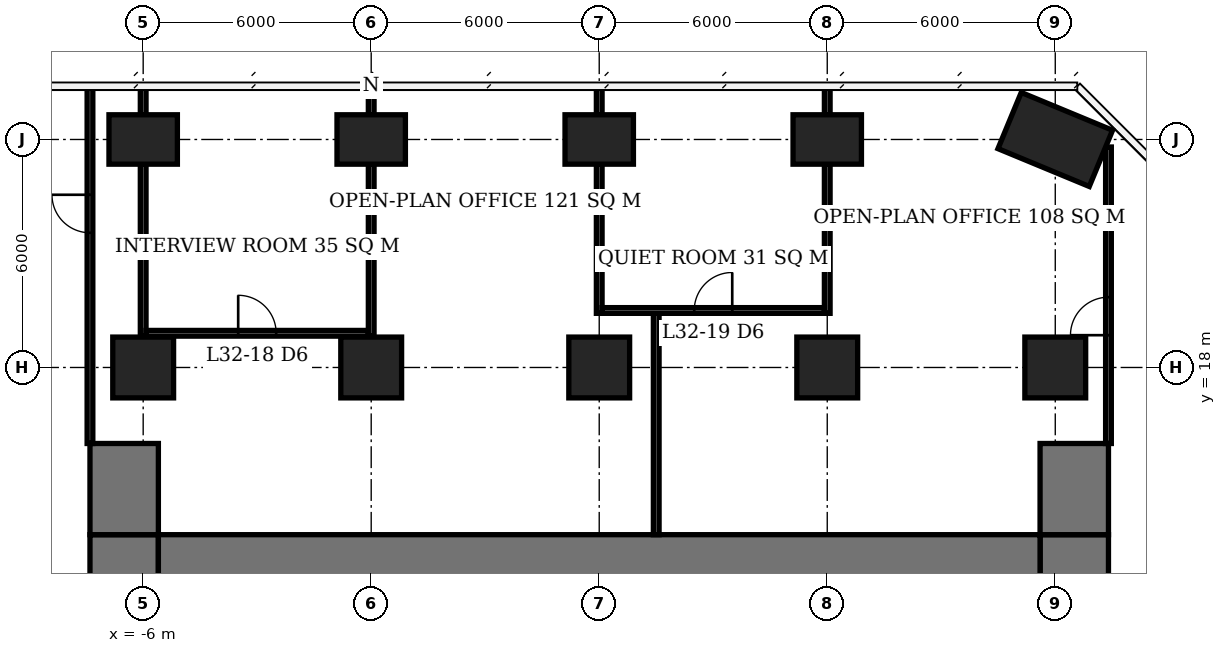
"""IFC4 building model, lengths in metres.
Left out: names, types, materials, properties, quantities, classifications, styles, units other than length and angle.
Written with IfcOpenShell. Run it as: python <this file> out.ifc"""

import sys

from ifc_helpers import new_model, si_unit, direction, frame, frame_2d, origin, origin_2d, place, context, subcontext, project, spatial, rectangle, extrude, element, fill, save


model = new_model("IFC4")
c1 = context("Model", 3, precision=1e-05, world=origin(), true_north=direction((0.0, 1.0)))
c2 = subcontext(c1, "Body", "Model", "MODEL_VIEW")
j1 = project(units=[si_unit("LENGTHUNIT", "METRE"), si_unit("PLANEANGLEUNIT", "RADIAN")], contexts=[c1])
p1 = place(None, origin())
s1 = spatial("IfcSite", under=j1, at=p1, CompositionType="ELEMENT")
p2 = place(p1, origin())
s2 = spatial("IfcBuilding", under=s1, at=p2, CompositionType="ELEMENT")
p3 = place(p2, frame((0.0, 0.0, 132.8)))
s3 = spatial("IfcBuildingStorey", under=s2, at=p3, CompositionType="ELEMENT", Elevation=132.8)
p4 = place(p3, frame((-6.0, 18.0, 0.0), z_axis=(0.0, 0.0, 1.0), x_axis=(1.0, 0.0, 0.0)))
e1 = element("IfcColumn", 1, at=p4, inside=s3, PredefinedType="COLUMN", context=c2, shape_type="SweptSolid", body=[
    extrude(rectangle(XDim=1.6, YDim=1.6, at=origin_2d()), origin(), (0.0, 0.0, 1.0), 3.9),
])
p5 = place(p3, frame((-6.0, 24.0, 0.0), z_axis=(0.0, 0.0, 1.0), x_axis=(1.0, 0.0, 0.0)))
e2 = element("IfcColumn", 2, at=p5, inside=s3, PredefinedType="COLUMN", context=c2, shape_type="SweptSolid", body=[
    extrude(rectangle(XDim=1.8, YDim=1.3, at=origin_2d()), origin(), (0.0, 0.0, 1.0), 3.9),
])
p6 = place(p3, frame((0.0, 18.0, 0.0), z_axis=(0.0, 0.0, 1.0), x_axis=(1.0, 0.0, 0.0)))
e3 = element("IfcColumn", 3, at=p6, inside=s3, PredefinedType="COLUMN", context=c2, shape_type="SweptSolid", body=[
    extrude(rectangle(XDim=1.6, YDim=1.6, at=origin_2d()), origin(), (0.0, 0.0, 1.0), 3.9),
])
p7 = place(p3, frame((0.0, 24.0, 0.0), z_axis=(0.0, 0.0, 1.0), x_axis=(1.0, 0.0, 0.0)))
e4 = element("IfcColumn", 4, at=p7, inside=s3, PredefinedType="COLUMN", context=c2, shape_type="SweptSolid", body=[
    extrude(rectangle(XDim=1.8, YDim=1.3, at=origin_2d()), origin(), (0.0, 0.0, 1.0), 3.9),
])
p8 = place(p3, frame((6.0, 18.0, 0.0), z_axis=(0.0, 0.0, 1.0), x_axis=(1.0, 0.0, 0.0)))
e5 = element("IfcColumn", 5, at=p8, inside=s3, PredefinedType="COLUMN", context=c2, shape_type="SweptSolid", body=[
    extrude(rectangle(XDim=1.6, YDim=1.6, at=origin_2d()), origin(), (0.0, 0.0, 1.0), 3.9),
])
p9 = place(p3, frame((6.0, 24.0, 0.0), z_axis=(0.0, 0.0, 1.0), x_axis=(1.0, 0.0, 0.0)))
e6 = element("IfcColumn", 6, at=p9, inside=s3, PredefinedType="COLUMN", context=c2, shape_type="SweptSolid", body=[
    extrude(rectangle(XDim=1.8, YDim=1.3, at=origin_2d()), origin(), (0.0, 0.0, 1.0), 3.9),
])
p10 = place(p3, frame((12.0, 18.0, 0.0), z_axis=(0.0, 0.0, 1.0), x_axis=(1.0, 0.0, 0.0)))
e7 = element("IfcColumn", 7, at=p10, inside=s3, PredefinedType="COLUMN", context=c2, shape_type="SweptSolid", body=[
    extrude(rectangle(XDim=1.6, YDim=1.6, at=origin_2d()), origin(), (0.0, 0.0, 1.0), 3.9),
])
p11 = place(p3, frame((12.0, 24.0, 0.0), z_axis=(0.0, 0.0, 1.0), x_axis=(1.0, 0.0, 0.0)))
e8 = element("IfcColumn", 8, at=p11, inside=s3, PredefinedType="COLUMN", context=c2, shape_type="SweptSolid", body=[
    extrude(rectangle(XDim=1.8, YDim=1.3, at=origin_2d()), origin(), (0.0, 0.0, 1.0), 3.9),
])
p12 = place(p3, frame((18.0, 18.0, 0.0), z_axis=(0.0, 0.0, 1.0), x_axis=(1.0, 0.0, 0.0)))
e9 = element("IfcColumn", 9, at=p12, inside=s3, PredefinedType="COLUMN", context=c2, shape_type="SweptSolid", body=[
    extrude(rectangle(XDim=1.6, YDim=1.6, at=origin_2d()), origin(), (0.0, 0.0, 1.0), 3.9),
])
p13 = place(p3, frame((18.0, 24.0, 0.0), z_axis=(0.0, 0.0, 1.0), x_axis=(0.923879532511, -0.382683432365, 0.0)))
e10 = element("IfcColumn", 10, at=p13, inside=s3, PredefinedType="COLUMN", context=c2, shape_type="SweptSolid", body=[
    extrude(rectangle(XDim=2.6, YDim=1.6, at=origin_2d()), origin(), (0.0, 0.0, 1.0), 3.9),
])
p14 = place(p3, frame((-5.6, 12.6, 0.0), z_axis=(0.0, 0.0, 1.0), x_axis=(1.0, 0.0, 0.0)))
e11 = element("IfcWall", 11, at=p14, inside=s3, PredefinedType="SHEAR", context=c2, shape_type="SweptSolid", body=[
    extrude(rectangle(XDim=23.2, YDim=2.0, at=frame_2d((11.6, 0.0))), origin(), (0.0, 0.0, 1.0), 3.9),
])
p15 = place(p3, frame((-6.5, -7.6, 0.0), z_axis=(0.0, 0.0, 1.0), x_axis=(0.0, 1.0, 0.0)))
e12 = element("IfcWall", 12, at=p15, inside=s3, PredefinedType="SHEAR", context=c2, shape_type="SweptSolid", body=[
    extrude(rectangle(XDim=21.2, YDim=1.8, at=frame_2d((10.6, 0.0))), origin(), (0.0, 0.0, 1.0), 3.9),
])
p16 = place(p15, frame((7.8, 0.0, 0.0)))
e13 = element("IfcOpeningElement", 13, at=p16, cuts=e12, PredefinedType="OPENING", context=c2, shape_type="SweptSolid", body=[
    extrude(rectangle(XDim=1.8, YDim=2.4, at=frame_2d((0.9, 1.2))), frame((0.0, 0.91, 0.0), z_axis=(0.0, -1.0, 0.0), x_axis=(1.0, 0.0, 0.0)), (0.0, 0.0, 1.0), 1.82),
])
p17 = place(p3, frame((18.5, -7.6, 0.0), z_axis=(0.0, 0.0, 1.0), x_axis=(0.0, 1.0, 0.0)))
e14 = element("IfcWall", 14, at=p17, inside=s3, PredefinedType="SHEAR", context=c2, shape_type="SweptSolid", body=[
    extrude(rectangle(XDim=21.2, YDim=1.8, at=frame_2d((10.6, 0.0))), origin(), (0.0, 0.0, 1.0), 3.9),
])
p18 = place(p17, frame((9.2, 0.0, 0.0)))
e15 = element("IfcOpeningElement", 15, at=p18, cuts=e14, PredefinedType="OPENING", context=c2, shape_type="SweptSolid", body=[
    extrude(rectangle(XDim=1.8, YDim=2.4, at=frame_2d((0.9, 1.2))), frame((0.0, 0.91, 0.0), z_axis=(0.0, -1.0, 0.0), x_axis=(1.0, 0.0, 0.0)), (0.0, 0.0, 1.0), 1.82),
])
for number, where, z_axis, x_axis in (
    (16, (-6.5, 13.6, 0.0), (0.0, 0.0, 1.0), (0.0, 1.0, 0.0)),
    (17, (18.5, 13.6, 0.0), (0.0, 0.0, 1.0), (0.0, 1.0, 0.0)),
):
    element("IfcWall", number, at=place(p3, frame(where, z_axis=z_axis, x_axis=x_axis)), inside=s3, PredefinedType="SHEAR", context=c2, shape_type="SweptSolid", body=[
        extrude(rectangle(XDim=2.4, YDim=1.8, at=frame_2d((1.2, 0.0))), origin(), (0.0, 0.0, 1.0), 3.9),
    ])
p19 = place(p3, frame((-5.925, 18.9, 0.0), z_axis=(0.0, 0.0, 1.0), x_axis=(1.0, 0.0, 0.0)))
e18 = element("IfcWall", 18, at=p19, inside=s3, PredefinedType="PARTITIONING", context=c2, shape_type="SweptSolid", body=[
    extrude(rectangle(XDim=5.85, YDim=0.15, at=frame_2d((2.925, 0.0))), origin(), (0.0, 0.0, 1.0), 3.65),
])
p20 = place(p19, frame((2.425, 0.0, 0.0)))
e19 = element("IfcOpeningElement", 19, at=p20, cuts=e18, PredefinedType="OPENING", context=c2, shape_type="SweptSolid", body=[
    extrude(rectangle(XDim=1.0, YDim=2.1, at=frame_2d((0.5, 1.05))), frame((0.0, 0.085, 0.0), z_axis=(0.0, -1.0, 0.0), x_axis=(1.0, 0.0, 0.0)), (0.0, 0.0, 1.0), 0.17),
])
p21 = place(p3, frame((6.075, 19.5, 0.0), z_axis=(0.0, 0.0, 1.0), x_axis=(1.0, 0.0, 0.0)))
e20 = element("IfcWall", 20, at=p21, inside=s3, PredefinedType="PARTITIONING", context=c2, shape_type="SweptSolid", body=[
    extrude(rectangle(XDim=5.85, YDim=0.15, at=frame_2d((2.925, 0.0))), origin(), (0.0, 0.0, 1.0), 3.65),
])
p22 = place(p21, frame((2.425, 0.0, 0.0)))
e21 = element("IfcOpeningElement", 21, at=p22, cuts=e20, PredefinedType="OPENING", context=c2, shape_type="SweptSolid", body=[
    extrude(rectangle(XDim=1.0, YDim=2.1, at=frame_2d((0.5, 1.05))), frame((0.0, 0.085, 0.0), z_axis=(0.0, -1.0, 0.0), x_axis=(1.0, 0.0, 0.0)), (0.0, 0.0, 1.0), 0.17),
])
p23 = place(p3, frame((-6.0, 18.825, 0.0), z_axis=(0.0, 0.0, 1.0), x_axis=(0.0, 1.0, 0.0)))
e22 = element("IfcWall", 22, at=p23, inside=s3, PredefinedType="PARTITIONING", context=c2, shape_type="SweptSolid", body=[
    extrude(rectangle(XDim=4.525, YDim=0.15, at=frame_2d((2.263, 0.0))), origin(), (0.0, 0.0, 1.0), 3.65),
])
p24 = place(p3, frame((-6.0, 24.65, 0.0), z_axis=(0.0, 0.0, 1.0), x_axis=(0.0, 1.0, 0.0)))
e23 = element("IfcWall", 23, at=p24, inside=s3, PredefinedType="PARTITIONING", context=c2, shape_type="SweptSolid", body=[
    extrude(rectangle(XDim=0.75, YDim=0.15, at=frame_2d((0.375, 0.0))), origin(), (0.0, 0.0, 1.0), 3.65),
])
p25 = place(p3, frame((0.0, 18.825, 0.0), z_axis=(0.0, 0.0, 1.0), x_axis=(0.0, 1.0, 0.0)))
e24 = element("IfcWall", 24, at=p25, inside=s3, PredefinedType="PARTITIONING", context=c2, shape_type="SweptSolid", body=[
    extrude(rectangle(XDim=4.525, YDim=0.15, at=frame_2d((2.263, 0.0))), origin(), (0.0, 0.0, 1.0), 3.65),
])
p26 = place(p3, frame((0.0, 24.65, 0.0), z_axis=(0.0, 0.0, 1.0), x_axis=(0.0, 1.0, 0.0)))
e25 = element("IfcWall", 25, at=p26, inside=s3, PredefinedType="PARTITIONING", context=c2, shape_type="SweptSolid", body=[
    extrude(rectangle(XDim=0.7, YDim=0.15, at=frame_2d((0.35, 0.0))), origin(), (0.0, 0.0, 1.0), 3.65),
])
p27 = place(p3, frame((6.0, 19.425, 0.0), z_axis=(0.0, 0.0, 1.0), x_axis=(0.0, 1.0, 0.0)))
e26 = element("IfcWall", 26, at=p27, inside=s3, PredefinedType="PARTITIONING", context=c2, shape_type="SweptSolid", body=[
    extrude(rectangle(XDim=3.925, YDim=0.15, at=frame_2d((1.962, 0.0))), origin(), (0.0, 0.0, 1.0), 3.65),
])
p28 = place(p3, frame((6.0, 24.65, 0.0), z_axis=(0.0, 0.0, 1.0), x_axis=(0.0, 1.0, 0.0)))
e27 = element("IfcWall", 27, at=p28, inside=s3, PredefinedType="PARTITIONING", context=c2, shape_type="SweptSolid", body=[
    extrude(rectangle(XDim=0.75, YDim=0.15, at=frame_2d((0.375, 0.0))), origin(), (0.0, 0.0, 1.0), 3.65),
])
p29 = place(p3, frame((12.0, 19.425, 0.0), z_axis=(0.0, 0.0, 1.0), x_axis=(0.0, 1.0, 0.0)))
e28 = element("IfcWall", 28, at=p29, inside=s3, PredefinedType="PARTITIONING", context=c2, shape_type="SweptSolid", body=[
    extrude(rectangle(XDim=3.925, YDim=0.15, at=frame_2d((1.962, 0.0))), origin(), (0.0, 0.0, 1.0), 3.65),
])
p30 = place(p3, frame((12.0, 24.65, 0.0), z_axis=(0.0, 0.0, 1.0), x_axis=(0.0, 1.0, 0.0)))
e29 = element("IfcWall", 29, at=p30, inside=s3, PredefinedType="PARTITIONING", context=c2, shape_type="SweptSolid", body=[
    extrude(rectangle(XDim=0.75, YDim=0.15, at=frame_2d((0.375, 0.0))), origin(), (0.0, 0.0, 1.0), 3.65),
])
p31 = place(p3, frame((-7.4, 16.0, 0.0), z_axis=(0.0, 0.0, 1.0), x_axis=(0.0, 1.0, 0.0)))
e30 = element("IfcWall", 30, at=p31, inside=s3, PredefinedType="PARTITIONING", context=c2, shape_type="SweptSolid", body=[
    extrude(rectangle(XDim=9.4, YDim=0.15, at=frame_2d((4.7, 0.0))), origin(), (0.0, 0.0, 1.0), 3.65),
])
p32 = place(p31, frame((5.545, 0.0, 0.0)))
e31 = element("IfcOpeningElement", 31, at=p32, cuts=e30, PredefinedType="OPENING", context=c2, shape_type="SweptSolid", body=[
    extrude(rectangle(XDim=1.0, YDim=2.1, at=frame_2d((0.5, 1.05))), frame((0.0, 0.085, 0.0), z_axis=(0.0, -1.0, 0.0), x_axis=(1.0, 0.0, 0.0)), (0.0, 0.0, 1.0), 0.17),
])
p33 = place(p3, frame((7.5, 13.6, 0.0), z_axis=(0.0, 0.0, 1.0), x_axis=(0.0, 1.0, 0.0)))
e32 = element("IfcWall", 32, at=p33, inside=s3, PredefinedType="PARTITIONING", context=c2, shape_type="SweptSolid", body=[
    extrude(rectangle(XDim=5.825, YDim=0.15, at=frame_2d((2.913, 0.0))), origin(), (0.0, 0.0, 1.0), 3.65),
])
p34 = place(p3, frame((19.4, 16.0, 0.0), z_axis=(0.0, 0.0, 1.0), x_axis=(0.0, 1.0, 0.0)))
e33 = element("IfcWall", 33, at=p34, inside=s3, PredefinedType="PARTITIONING", context=c2, shape_type="SweptSolid", body=[
    extrude(rectangle(XDim=7.802, YDim=0.15, at=frame_2d((3.901, 0.0))), origin(), (0.0, 0.0, 1.0), 3.65),
])
p35 = place(p34, frame((2.85, 0.0, 0.0)))
e34 = element("IfcOpeningElement", 34, at=p35, cuts=e33, PredefinedType="OPENING", context=c2, shape_type="SweptSolid", body=[
    extrude(rectangle(XDim=1.0, YDim=2.1, at=frame_2d((0.5, 1.05))), frame((0.0, 0.085, 0.0), z_axis=(0.0, -1.0, 0.0), x_axis=(1.0, 0.0, 0.0)), (0.0, 0.0, 1.0), 0.17),
])
p36 = place(p20, origin())
e35 = element("IfcDoor", 35, at=p36, inside=s3, OperationType="SINGLE_SWING_LEFT", PredefinedType="DOOR", context=c2, shape_type="SweptSolid", body=[
    extrude(rectangle(XDim=1.0, YDim=2.1, at=frame_2d((0.5, 1.05))), frame((0.0, 0.025, 0.0), z_axis=(0.0, -1.0, 0.0), x_axis=(1.0, 0.0, 0.0)), (0.0, 0.0, 1.0), 0.05),
])
fill(e19, e35)
p37 = place(p22, origin())
e36 = element("IfcDoor", 36, at=p37, inside=s3, OperationType="SINGLE_SWING_RIGHT", PredefinedType="DOOR", context=c2, shape_type="SweptSolid", body=[
    extrude(rectangle(XDim=1.0, YDim=2.1, at=frame_2d((0.5, 1.05))), frame((0.0, 0.025, 0.0), z_axis=(0.0, -1.0, 0.0), x_axis=(1.0, 0.0, 0.0)), (0.0, 0.0, 1.0), 0.05),
])
fill(e21, e36)
p38 = place(p32, origin())
e37 = element("IfcDoor", 37, at=p38, inside=s3, OperationType="SINGLE_SWING_RIGHT", PredefinedType="DOOR", context=c2, shape_type="SweptSolid", body=[
    extrude(rectangle(XDim=1.0, YDim=2.1, at=frame_2d((0.5, 1.05))), frame((0.0, 0.025, 0.0), z_axis=(0.0, -1.0, 0.0), x_axis=(1.0, 0.0, 0.0)), (0.0, 0.0, 1.0), 0.05),
])
fill(e31, e37)
p39 = place(p35, origin())
e38 = element("IfcDoor", 38, at=p39, inside=s3, OperationType="SINGLE_SWING_LEFT", PredefinedType="DOOR", context=c2, shape_type="SweptSolid", body=[
    extrude(rectangle(XDim=1.0, YDim=2.1, at=frame_2d((0.5, 1.05))), frame((0.0, 0.025, 0.0), z_axis=(0.0, -1.0, 0.0), x_axis=(1.0, 0.0, 0.0)), (0.0, 0.0, 1.0), 0.05),
])
fill(e34, e38)
save(model, sys.argv[1])
